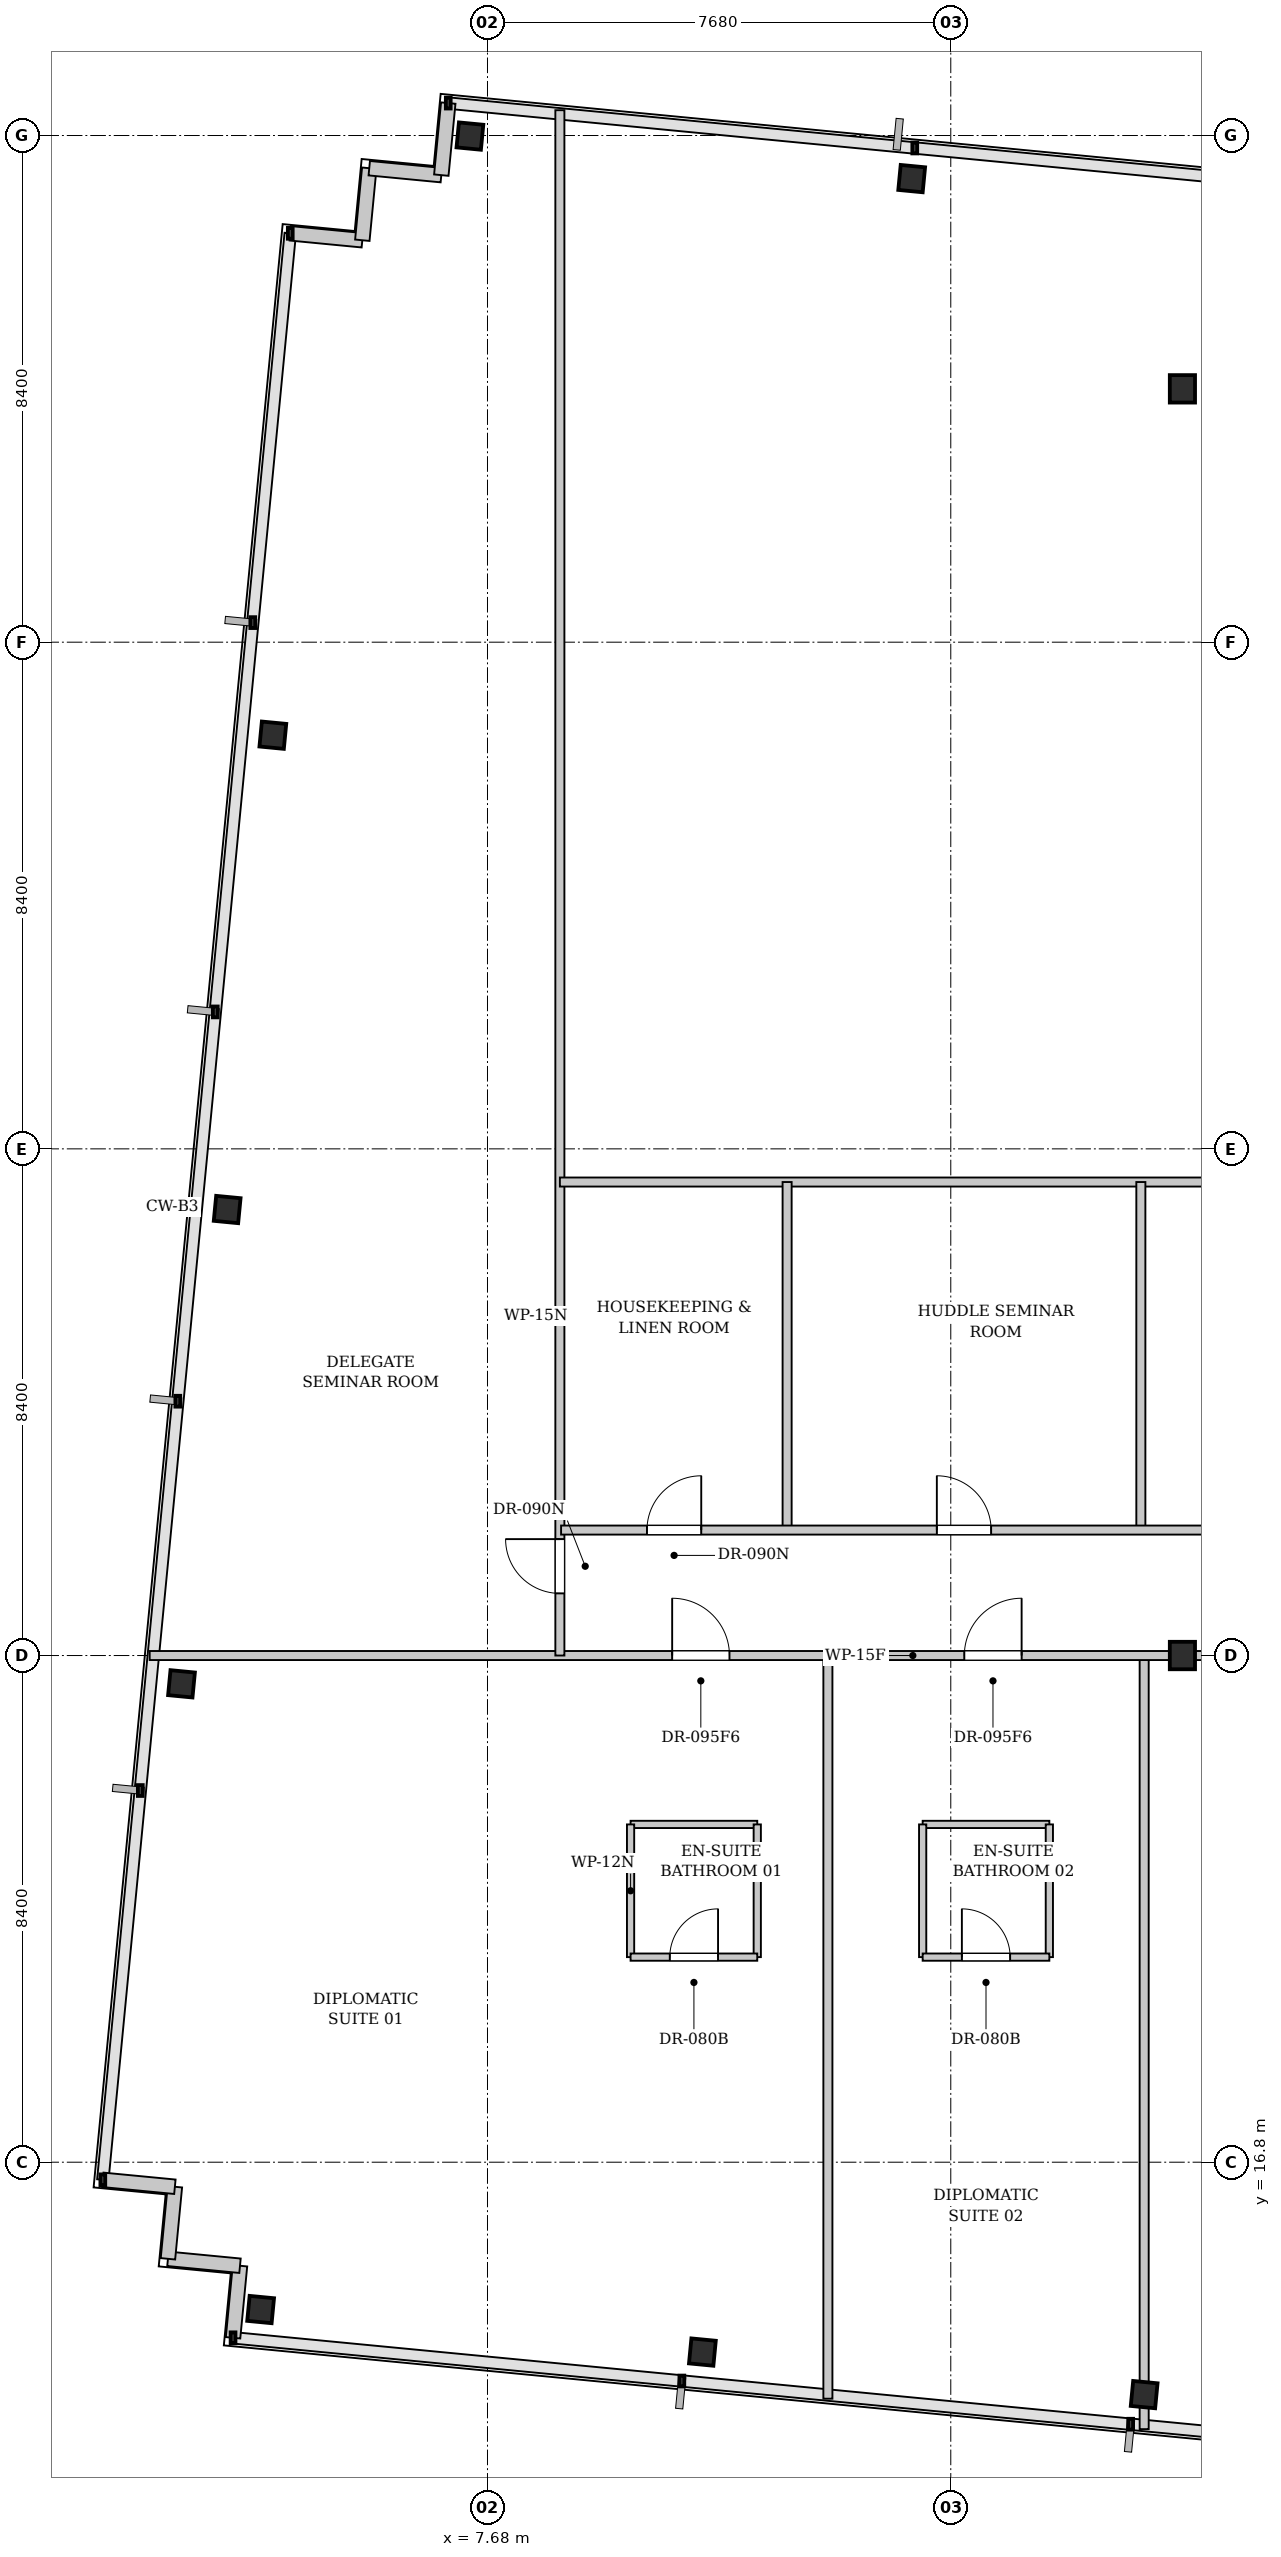
"""IFC4 building model, lengths in metres.
Left out: names, types, materials, properties, quantities, classifications, styles, units other than length and angle.
Written with IfcOpenShell. Run it as: python <this file> out.ifc"""

import sys

from ifc_helpers import new_model, si_unit, direction, frame, frame_2d, origin, origin_2d, place, context, subcontext, project, spatial, rectangle, i_section, extrude, element, fill, save


model = new_model("IFC4")
c1 = context("Model", 3, precision=1e-05, world=origin(), true_north=direction((0.0, 1.0)))
c2 = subcontext(c1, "Body", "Model", "MODEL_VIEW")
j1 = project(units=[si_unit("LENGTHUNIT", "METRE"), si_unit("PLANEANGLEUNIT", "RADIAN")], contexts=[c1])
p1 = place(None, origin())
s1 = spatial("IfcSite", under=j1, at=p1, CompositionType="ELEMENT")
p2 = place(p1, origin())
s2 = spatial("IfcBuilding", under=s1, at=p2, CompositionType="ELEMENT")
p3 = place(p2, frame((0.0, 0.0, 155.6)))
s3 = spatial("IfcBuildingStorey", under=s2, at=p3, CompositionType="ELEMENT", Elevation=155.6)
for number, where, z_axis, x_axis in (
    (1, (19.2, 25.2, 0.0), (0.0, 0.0, 1.0), (1.0, 0.0, 0.0)),
    (2, (19.2, 46.2, 0.0), (0.0, 0.0, 1.0), (1.0, 0.0, 0.0)),
):
    element("IfcColumn", number, at=place(p3, frame(where, z_axis=z_axis, x_axis=x_axis)), inside=s3, PredefinedType="COLUMN", context=c2, shape_type="SweptSolid", body=[
        extrude(i_section(OverallWidth=0.418, OverallDepth=0.455, WebThickness=0.042, FlangeThickness=0.068, FilletRadius=0.015, at=origin_2d()), origin(), (0.0, 0.0, 1.0), 3.3),
    ])
for number, where, z_axis, x_axis in (
    (3, (3.919, 14.357, 0.0), (0.0, 0.0, 1.0), (0.995, -0.096, 0.0)),
    (4, (11.242, 13.652, 0.0), (0.0, 0.0, 1.0), (0.995, -0.096, 0.0)),
    (5, (18.566, 12.947, 0.0), (0.0, 0.0, 1.0), (0.995, -0.096, 0.0)),
    (6, (7.389, 50.391, 0.0), (0.0, 0.0, 1.0), (0.995, -0.096, 0.0)),
    (7, (14.712, 49.686, 0.0), (0.0, 0.0, 1.0), (0.995, -0.096, 0.0)),
    (8, (2.607, 24.731, 0.0), (0.0, 0.0, 1.0), (0.995, -0.096, 0.0)),
    (9, (3.365, 32.594, 0.0), (0.0, 0.0, 1.0), (0.995, -0.096, 0.0)),
    (10, (4.122, 40.458, 0.0), (0.0, 0.0, 1.0), (0.995, -0.096, 0.0)),
):
    element("IfcColumn", number, at=place(p3, frame(where, z_axis=z_axis, x_axis=x_axis)), inside=s3, PredefinedType="COLUMN", context=c2, shape_type="SweptSolid", body=[
        extrude(i_section(OverallWidth=0.406, OverallDepth=0.416, WebThickness=0.03, FlangeThickness=0.048, FilletRadius=0.015, at=origin_2d()), origin(), (0.0, 0.0, 1.0), 3.3),
    ])
for number, where, z_axis, x_axis in (
    (11, (3.462, 13.889, 0.0), (0.0, 0.0, 1.0), (0.096, 0.995, 0.0)),
    (12, (3.577, 15.083, 0.0), (0.0, 0.0, 1.0), (-0.995, 0.096, 0.0)),
):
    element("IfcWall", number, at=place(p3, frame(where, z_axis=z_axis, x_axis=x_axis)), inside=s3, PredefinedType="SOLIDWALL", context=c2, shape_type="SweptSolid", body=[
        extrude(rectangle(XDim=1.2, YDim=0.24, at=frame_2d((0.6, 0.0))), origin(), (0.0, 0.0, 1.0), 3.08),
    ])
p4 = place(p3, frame((2.383, 15.198, 0.0), z_axis=(0.0, 0.0, 1.0), x_axis=(0.095836473879, 0.995397091755, 0.0)))
e13 = element("IfcWall", 13, at=p4, inside=s3, PredefinedType="SOLIDWALL", context=c2, shape_type="SweptSolid", body=[
    extrude(rectangle(XDim=1.2, YDim=0.24, at=frame_2d((0.6, 0.0))), origin(), (0.0, 0.0, 1.0), 3.08),
])
p5 = place(p3, frame((2.498, 16.393, 0.0), z_axis=(0.0, 0.0, 1.0), x_axis=(-0.995398960025, 0.095817067274, 0.0)))
e14 = element("IfcWall", 14, at=p5, inside=s3, PredefinedType="SOLIDWALL", context=c2, shape_type="SweptSolid", body=[
    extrude(rectangle(XDim=1.2, YDim=0.24, at=frame_2d((0.6, 0.0))), origin(), (0.0, 0.0, 1.0), 3.08),
])
p6 = place(p3, frame((4.411, 48.779, 0.0), z_axis=(0.0, 0.0, 1.0), x_axis=(0.995397091755, -0.095836473879, 0.0)))
e15 = element("IfcWall", 15, at=p6, inside=s3, PredefinedType="SOLIDWALL", context=c2, shape_type="SweptSolid", body=[
    extrude(rectangle(XDim=1.2, YDim=0.24, at=frame_2d((0.6, 0.0))), origin(), (0.0, 0.0, 1.0), 3.08),
])
p7 = place(p3, frame((5.605, 48.664, 0.0), z_axis=(0.0, 0.0, 1.0), x_axis=(0.096018626938, 0.995379537303, 0.0)))
e16 = element("IfcWall", 16, at=p7, inside=s3, PredefinedType="SOLIDWALL", context=c2, shape_type="SweptSolid", body=[
    extrude(rectangle(XDim=1.2, YDim=0.24, at=frame_2d((0.6, 0.0))), origin(), (0.0, 0.0, 1.0), 3.08),
])
for number, where, z_axis, x_axis in (
    (17, (5.72, 49.858, 0.0), (0.0, 0.0, 1.0), (0.995, -0.096, 0.0)),
    (18, (6.915, 49.743, 0.0), (0.0, 0.0, 1.0), (0.096, 0.995, 0.0)),
):
    element("IfcWall", number, at=place(p3, frame(where, z_axis=z_axis, x_axis=x_axis)), inside=s3, PredefinedType="SOLIDWALL", context=c2, shape_type="SweptSolid", body=[
        extrude(rectangle(XDim=1.2, YDim=0.24, at=frame_2d((0.6, 0.0))), origin(), (0.0, 0.0, 1.0), 3.08),
    ])
p8 = place(p3, frame((10.052, 22.4, 0.0), z_axis=(0.0, 0.0, 1.0), x_axis=(1.0, 0.0, 0.0)))
e19 = element("IfcWall", 19, at=p8, inside=s3, PredefinedType="PARTITIONING", context=c2, shape_type="SweptSolid", body=[
    extrude(rectangle(XDim=2.1, YDim=0.12, at=frame_2d((1.05, 0.0))), origin(), (0.0, 0.0, 1.0), 3.08),
])
for number, where, z_axis, x_axis in (
    (20, (10.052, 20.2, 0.0), (0.0, 0.0, 1.0), (0.0, 1.0, 0.0)),
    (21, (12.152, 20.2, 0.0), (0.0, 0.0, 1.0), (0.0, 1.0, 0.0)),
):
    element("IfcWall", number, at=place(p3, frame(where, z_axis=z_axis, x_axis=x_axis)), inside=s3, PredefinedType="PARTITIONING", context=c2, shape_type="SweptSolid", body=[
        extrude(rectangle(XDim=2.2, YDim=0.12, at=frame_2d((1.1, 0.0))), origin(), (0.0, 0.0, 1.0), 3.08),
    ])
p9 = place(p3, frame((10.052, 20.2, 0.0), z_axis=(0.0, 0.0, 1.0), x_axis=(1.0, 0.0, 0.0)))
e22 = element("IfcWall", 22, at=p9, inside=s3, PredefinedType="PARTITIONING", context=c2, shape_type="SweptSolid", body=[
    extrude(rectangle(XDim=2.1, YDim=0.12, at=frame_2d((1.05, 0.0))), origin(), (0.0, 0.0, 1.0), 3.08),
])
p10 = place(p9, frame((0.65, 0.0, 0.0)))
e23 = element("IfcOpeningElement", 23, at=p10, cuts=e22, PredefinedType="OPENING", context=c2, shape_type="SweptSolid", body=[
    extrude(rectangle(XDim=0.8, YDim=2.1, at=frame_2d((0.4, 1.05))), frame((0.0, 0.07, 0.0), z_axis=(0.0, -1.0, 0.0), x_axis=(1.0, 0.0, 0.0)), (0.0, 0.0, 1.0), 0.14),
])
p11 = place(p3, frame((14.894, 22.4, 0.0), z_axis=(0.0, 0.0, 1.0), x_axis=(1.0, 0.0, 0.0)))
e24 = element("IfcWall", 24, at=p11, inside=s3, PredefinedType="PARTITIONING", context=c2, shape_type="SweptSolid", body=[
    extrude(rectangle(XDim=2.1, YDim=0.12, at=frame_2d((1.05, 0.0))), origin(), (0.0, 0.0, 1.0), 3.08),
])
for number, where, z_axis, x_axis in (
    (25, (14.894, 20.2, 0.0), (0.0, 0.0, 1.0), (0.0, 1.0, 0.0)),
    (26, (16.994, 20.2, 0.0), (0.0, 0.0, 1.0), (0.0, 1.0, 0.0)),
):
    element("IfcWall", number, at=place(p3, frame(where, z_axis=z_axis, x_axis=x_axis)), inside=s3, PredefinedType="PARTITIONING", context=c2, shape_type="SweptSolid", body=[
        extrude(rectangle(XDim=2.2, YDim=0.12, at=frame_2d((1.1, 0.0))), origin(), (0.0, 0.0, 1.0), 3.08),
    ])
p12 = place(p3, frame((14.894, 20.2, 0.0), z_axis=(0.0, 0.0, 1.0), x_axis=(1.0, 0.0, 0.0)))
e27 = element("IfcWall", 27, at=p12, inside=s3, PredefinedType="PARTITIONING", context=c2, shape_type="SweptSolid", body=[
    extrude(rectangle(XDim=2.1, YDim=0.12, at=frame_2d((1.05, 0.0))), origin(), (0.0, 0.0, 1.0), 3.08),
])
p13 = place(p12, frame((0.65, 0.0, 0.0)))
e28 = element("IfcOpeningElement", 28, at=p13, cuts=e27, PredefinedType="OPENING", context=c2, shape_type="SweptSolid", body=[
    extrude(rectangle(XDim=0.8, YDim=2.1, at=frame_2d((0.4, 1.05))), frame((0.0, 0.07, 0.0), z_axis=(0.0, -1.0, 0.0), x_axis=(1.0, 0.0, 0.0)), (0.0, 0.0, 1.0), 0.14),
])
p14 = place(p3, frame((13.323, 12.879, 0.0), z_axis=(0.0, 0.0, 1.0), x_axis=(0.0, 1.0, 0.0)))
e29 = element("IfcWall", 29, at=p14, inside=s3, PredefinedType="PARTITIONING", context=c2, shape_type="SweptSolid", body=[
    extrude(rectangle(XDim=12.341, YDim=0.15, at=frame_2d((6.17, 0.0))), origin(), (0.0, 0.0, 1.0), 3.08),
])
p15 = place(p3, frame((18.566, 12.374, 0.0), z_axis=(0.0, 0.0, 1.0), x_axis=(0.0, 1.0, 0.0)))
e30 = element("IfcWall", 30, at=p15, inside=s3, PredefinedType="PARTITIONING", context=c2, shape_type="SweptSolid", body=[
    extrude(rectangle(XDim=12.846, YDim=0.15, at=frame_2d((6.423, 0.0))), origin(), (0.0, 0.0, 1.0), 2.475),
])
p16 = place(p3, frame((2.08, 25.2, 0.0), z_axis=(0.0, 0.0, 1.0), x_axis=(1.0, 0.0, 0.0)))
e31 = element("IfcWall", 31, at=p16, inside=s3, PredefinedType="PARTITIONING", context=c2, shape_type="SweptSolid", body=[
    extrude(rectangle(XDim=57.505, YDim=0.15, at=frame_2d((28.752, 0.0))), origin(), (0.0, 0.0, 1.0), 2.475),
])
p17 = place(p16, frame((8.662, 0.0, 0.0)))
e32 = element("IfcOpeningElement", 32, at=p17, cuts=e31, PredefinedType="OPENING", context=c2, shape_type="SweptSolid", body=[
    extrude(rectangle(XDim=0.95, YDim=2.15, at=frame_2d((0.475, 1.075))), frame((0.0, 0.085, 0.0), z_axis=(0.0, -1.0, 0.0), x_axis=(1.0, 0.0, 0.0)), (0.0, 0.0, 1.0), 0.17),
])
p18 = place(p16, frame((13.504, 0.0, 0.0)))
e33 = element("IfcOpeningElement", 33, at=p18, cuts=e31, PredefinedType="OPENING", context=c2, shape_type="SweptSolid", body=[
    extrude(rectangle(XDim=0.95, YDim=2.15, at=frame_2d((0.475, 1.075))), frame((0.0, 0.085, 0.0), z_axis=(0.0, -1.0, 0.0), x_axis=(1.0, 0.0, 0.0)), (0.0, 0.0, 1.0), 0.17),
])
p19 = place(p16, frame((18.512, 0.0, 0.0)))
e34 = element("IfcOpeningElement", 34, at=p19, cuts=e31, PredefinedType="OPENING", context=c2, shape_type="SweptSolid", body=[
    extrude(rectangle(XDim=0.95, YDim=2.15, at=frame_2d((0.475, 1.075))), frame((0.0, 0.085, 0.0), z_axis=(0.0, -1.0, 0.0), x_axis=(1.0, 0.0, 0.0)), (0.0, 0.0, 1.0), 0.17),
])
p20 = place(p16, frame((24.937, 0.0, 0.0)))
e35 = element("IfcOpeningElement", 35, at=p20, cuts=e31, PredefinedType="OPENING", context=c2, shape_type="SweptSolid", body=[
    extrude(rectangle(XDim=0.95, YDim=2.15, at=frame_2d((0.475, 1.075))), frame((0.0, 0.085, 0.0), z_axis=(0.0, -1.0, 0.0), x_axis=(1.0, 0.0, 0.0)), (0.0, 0.0, 1.0), 0.17),
])
p21 = place(p16, frame((31.044, 0.0, 0.0)))
e36 = element("IfcOpeningElement", 36, at=p21, cuts=e31, PredefinedType="OPENING", context=c2, shape_type="SweptSolid", body=[
    extrude(rectangle(XDim=0.95, YDim=2.15, at=frame_2d((0.475, 1.075))), frame((0.0, 0.085, 0.0), z_axis=(0.0, -1.0, 0.0), x_axis=(1.0, 0.0, 0.0)), (0.0, 0.0, 1.0), 0.17),
])
p22 = place(p16, frame((37.897, 0.0, 0.0)))
e37 = element("IfcOpeningElement", 37, at=p22, cuts=e31, PredefinedType="OPENING", context=c2, shape_type="SweptSolid", body=[
    extrude(rectangle(XDim=0.95, YDim=2.15, at=frame_2d((0.475, 1.075))), frame((0.0, 0.085, 0.0), z_axis=(0.0, -1.0, 0.0), x_axis=(1.0, 0.0, 0.0)), (0.0, 0.0, 1.0), 0.17),
])
p23 = place(p16, frame((41.489, 0.0, 0.0)))
e38 = element("IfcOpeningElement", 38, at=p23, cuts=e31, PredefinedType="OPENING", context=c2, shape_type="SweptSolid", body=[
    extrude(rectangle(XDim=0.95, YDim=2.15, at=frame_2d((0.475, 1.075))), frame((0.0, 0.085, 0.0), z_axis=(0.0, -1.0, 0.0), x_axis=(1.0, 0.0, 0.0)), (0.0, 0.0, 1.0), 0.17),
])
p24 = place(p16, frame((47.351, 0.0, 0.0)))
e39 = element("IfcOpeningElement", 39, at=p24, cuts=e31, PredefinedType="OPENING", context=c2, shape_type="SweptSolid", body=[
    extrude(rectangle(XDim=0.95, YDim=2.15, at=frame_2d((0.475, 1.075))), frame((0.0, 0.085, 0.0), z_axis=(0.0, -1.0, 0.0), x_axis=(1.0, 0.0, 0.0)), (0.0, 0.0, 1.0), 0.17),
])
p25 = place(p16, frame((50.092, 0.0, 0.0)))
e40 = element("IfcOpeningElement", 40, at=p25, cuts=e31, PredefinedType="OPENING", context=c2, shape_type="SweptSolid", body=[
    extrude(rectangle(XDim=0.95, YDim=2.15, at=frame_2d((0.475, 1.075))), frame((0.0, 0.085, 0.0), z_axis=(0.0, -1.0, 0.0), x_axis=(1.0, 0.0, 0.0)), (0.0, 0.0, 1.0), 0.17),
])
p26 = place(p3, frame((8.88, 25.2, 0.0), z_axis=(0.0, 0.0, 1.0), x_axis=(0.0, 1.0, 0.0)))
e41 = element("IfcWall", 41, at=p26, inside=s3, PredefinedType="PARTITIONING", context=c2, shape_type="SweptSolid", body=[
    extrude(rectangle(XDim=25.62, YDim=0.15, at=frame_2d((12.81, 0.0))), origin(), (0.0, 0.0, 1.0), 3.08),
])
p27 = place(p26, frame((1.03, 0.0, 0.0)))
e42 = element("IfcOpeningElement", 42, at=p27, cuts=e41, PredefinedType="OPENING", context=c2, shape_type="SweptSolid", body=[
    extrude(rectangle(XDim=0.9, YDim=2.15, at=frame_2d((0.45, 1.075))), frame((0.0, 0.085, 0.0), z_axis=(0.0, -1.0, 0.0), x_axis=(1.0, 0.0, 0.0)), (0.0, 0.0, 1.0), 0.17),
])
p28 = place(p3, frame((8.88, 33.05, 0.0), z_axis=(0.0, 0.0, 1.0), x_axis=(1.0, 0.0, 0.0)))
e43 = element("IfcWall", 43, at=p28, inside=s3, PredefinedType="PARTITIONING", context=c2, shape_type="SweptSolid", body=[
    extrude(rectangle(XDim=16.32, YDim=0.15, at=frame_2d((8.16, 0.0))), origin(), (0.0, 0.0, 1.0), 2.475),
])
for number, where, z_axis, x_axis in (
    (44, (12.647, 27.28, 0.0), (0.0, 0.0, 1.0), (0.0, 1.0, 0.0)),
    (45, (18.511, 27.28, 0.0), (0.0, 0.0, 1.0), (0.0, 1.0, 0.0)),
):
    element("IfcWall", number, at=place(p3, frame(where, z_axis=z_axis, x_axis=x_axis)), inside=s3, PredefinedType="PARTITIONING", context=c2, shape_type="SweptSolid", body=[
        extrude(rectangle(XDim=5.77, YDim=0.15, at=frame_2d((2.885, 0.0))), origin(), (0.0, 0.0, 1.0), 3.08),
    ])
p29 = place(p3, frame((8.9, 27.28, 0.0), z_axis=(0.0, 0.0, 1.0), x_axis=(1.0, 0.0, 0.0)))
e46 = element("IfcWall", 46, at=p29, inside=s3, PredefinedType="PARTITIONING", context=c2, shape_type="SweptSolid", body=[
    extrude(rectangle(XDim=16.29, YDim=0.15, at=frame_2d((8.145, 0.0))), origin(), (0.0, 0.0, 1.0), 2.475),
])
p30 = place(p29, frame((1.424, 0.0, 0.0)))
e47 = element("IfcOpeningElement", 47, at=p30, cuts=e46, PredefinedType="OPENING", context=c2, shape_type="SweptSolid", body=[
    extrude(rectangle(XDim=0.9, YDim=2.15, at=frame_2d((0.45, 1.075))), frame((0.0, 0.085, 0.0), z_axis=(0.0, -1.0, 0.0), x_axis=(1.0, 0.0, 0.0)), (0.0, 0.0, 1.0), 0.17),
])
p31 = place(p29, frame((6.229, 0.0, 0.0)))
e48 = element("IfcOpeningElement", 48, at=p31, cuts=e46, PredefinedType="OPENING", context=c2, shape_type="SweptSolid", body=[
    extrude(rectangle(XDim=0.9, YDim=2.15, at=frame_2d((0.45, 1.075))), frame((0.0, 0.085, 0.0), z_axis=(0.0, -1.0, 0.0), x_axis=(1.0, 0.0, 0.0)), (0.0, 0.0, 1.0), 0.17),
])
p32 = place(p29, frame((12.5, 0.0, 0.0)))
e49 = element("IfcOpeningElement", 49, at=p32, cuts=e46, PredefinedType="OPENING", context=c2, shape_type="SweptSolid", body=[
    extrude(rectangle(XDim=0.9, YDim=2.15, at=frame_2d((0.45, 1.075))), frame((0.0, 0.085, 0.0), z_axis=(0.0, -1.0, 0.0), x_axis=(1.0, 0.0, 0.0)), (0.0, 0.0, 1.0), 0.17),
])
p33 = place(p10, origin())
e50 = element("IfcDoor", 50, at=p33, inside=s3, OperationType="SINGLE_SWING_RIGHT", PredefinedType="DOOR", context=c2, shape_type="SweptSolid", body=[
    extrude(rectangle(XDim=0.8, YDim=2.1, at=frame_2d((0.4, 1.05))), frame((0.0, 0.025, 0.0), z_axis=(0.0, -1.0, 0.0), x_axis=(1.0, 0.0, 0.0)), (0.0, 0.0, 1.0), 0.05),
])
fill(e23, e50)
p34 = place(p13, origin())
e51 = element("IfcDoor", 51, at=p34, inside=s3, OperationType="SINGLE_SWING_LEFT", PredefinedType="DOOR", context=c2, shape_type="SweptSolid", body=[
    extrude(rectangle(XDim=0.8, YDim=2.1, at=frame_2d((0.4, 1.05))), frame((0.0, 0.025, 0.0), z_axis=(0.0, -1.0, 0.0), x_axis=(1.0, 0.0, 0.0)), (0.0, 0.0, 1.0), 0.05),
])
fill(e28, e51)
p35 = place(p17, origin())
e52 = element("IfcDoor", 52, at=p35, inside=s3, OperationType="SINGLE_SWING_LEFT", PredefinedType="DOOR", context=c2, shape_type="SweptSolid", body=[
    extrude(rectangle(XDim=0.95, YDim=2.15, at=frame_2d((0.475, 1.075))), frame((0.0, 0.025, 0.0), z_axis=(0.0, -1.0, 0.0), x_axis=(1.0, 0.0, 0.0)), (0.0, 0.0, 1.0), 0.05),
])
fill(e32, e52)
p36 = place(p18, origin())
e53 = element("IfcDoor", 53, at=p36, inside=s3, OperationType="SINGLE_SWING_RIGHT", PredefinedType="DOOR", context=c2, shape_type="SweptSolid", body=[
    extrude(rectangle(XDim=0.95, YDim=2.15, at=frame_2d((0.475, 1.075))), frame((0.0, 0.025, 0.0), z_axis=(0.0, -1.0, 0.0), x_axis=(1.0, 0.0, 0.0)), (0.0, 0.0, 1.0), 0.05),
])
fill(e33, e53)
p37 = place(p27, origin())
e54 = element("IfcDoor", 54, at=p37, inside=s3, OperationType="SINGLE_SWING_RIGHT", PredefinedType="DOOR", context=c2, shape_type="SweptSolid", body=[
    extrude(rectangle(XDim=0.9, YDim=2.15, at=frame_2d((0.45, 1.075))), frame((0.0, 0.025, 0.0), z_axis=(0.0, -1.0, 0.0), x_axis=(1.0, 0.0, 0.0)), (0.0, 0.0, 1.0), 0.05),
])
fill(e42, e54)
p38 = place(p30, origin())
e55 = element("IfcDoor", 55, at=p38, inside=s3, OperationType="SINGLE_SWING_RIGHT", PredefinedType="DOOR", context=c2, shape_type="SweptSolid", body=[
    extrude(rectangle(XDim=0.9, YDim=2.15, at=frame_2d((0.45, 1.075))), frame((0.0, 0.025, 0.0), z_axis=(0.0, -1.0, 0.0), x_axis=(1.0, 0.0, 0.0)), (0.0, 0.0, 1.0), 0.05),
])
fill(e47, e55)
p39 = place(p31, origin())
e56 = element("IfcDoor", 56, at=p39, inside=s3, OperationType="SINGLE_SWING_LEFT", PredefinedType="DOOR", context=c2, shape_type="SweptSolid", body=[
    extrude(rectangle(XDim=0.9, YDim=2.15, at=frame_2d((0.45, 1.075))), frame((0.0, 0.025, 0.0), z_axis=(0.0, -1.0, 0.0), x_axis=(1.0, 0.0, 0.0)), (0.0, 0.0, 1.0), 0.05),
])
fill(e48, e56)
save(model, sys.argv[1])
